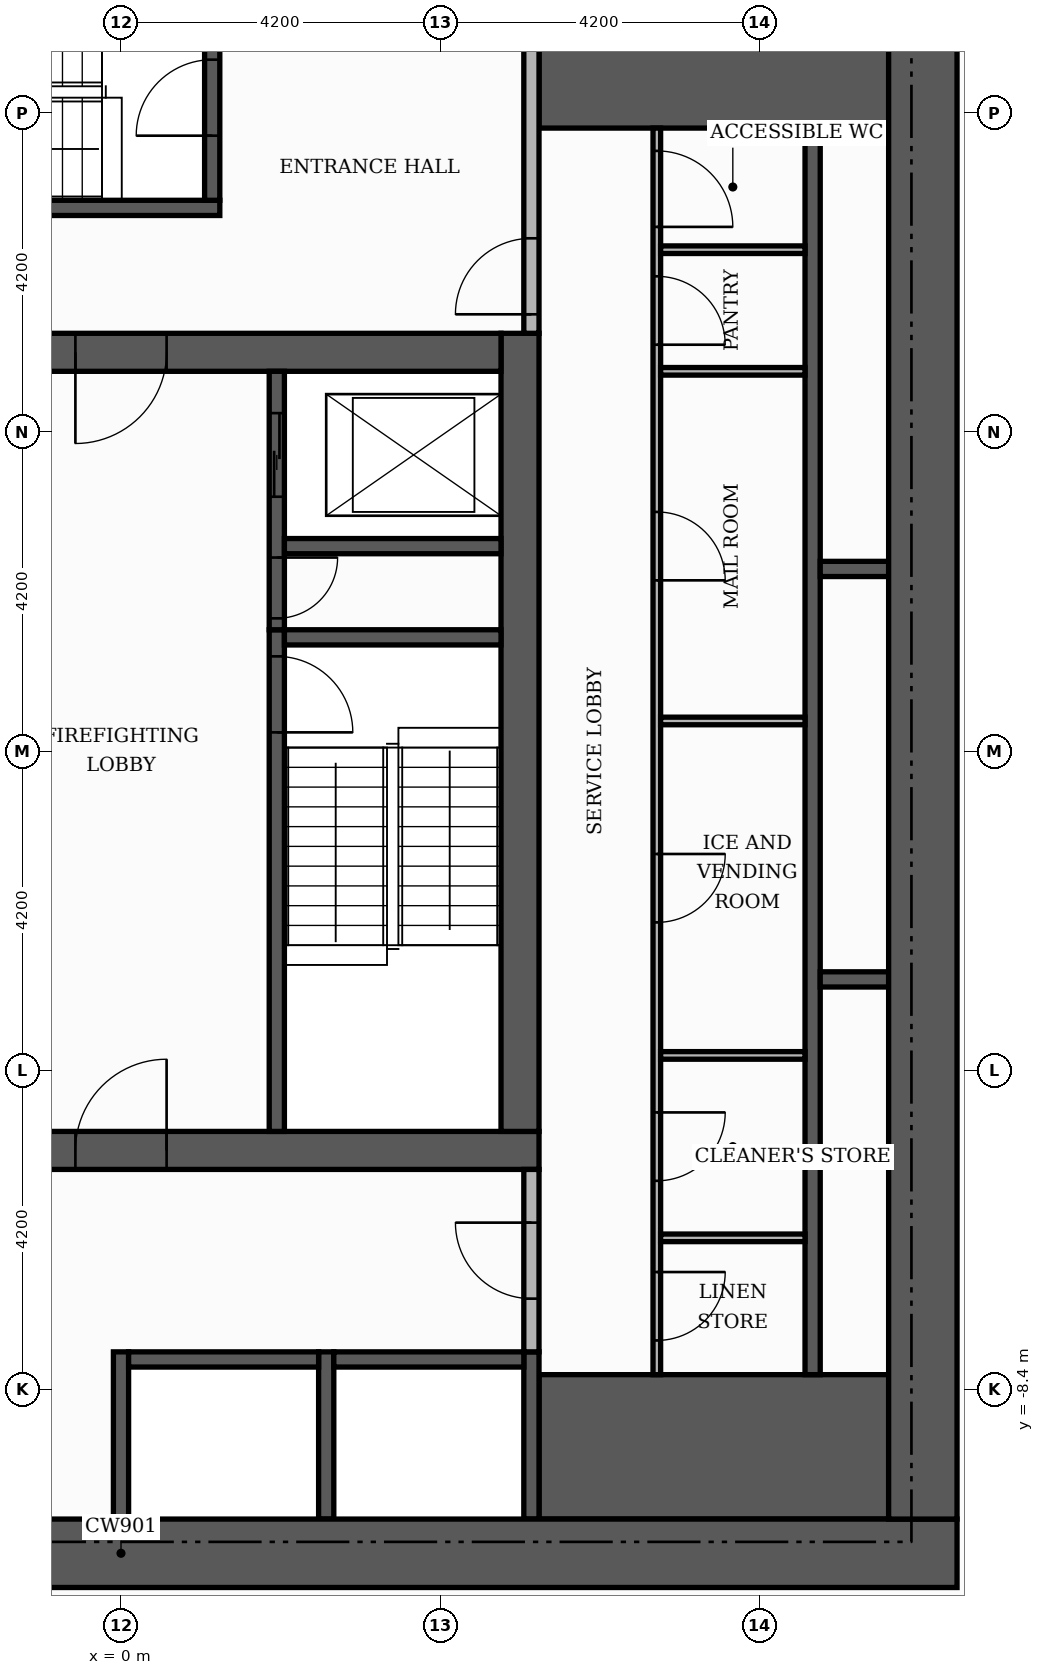
"""IFC4 building model, lengths in metres.
Left out: names, types, materials, properties, quantities, classifications, styles, units other than length and angle.
Written with IfcOpenShell. Run it as: python <this file> out.ifc"""

import sys

from ifc_helpers import new_model, si_unit, direction, frame, frame_2d, origin, place, context, subcontext, project, spatial, rectangle, extrude, element, fill, save


model = new_model("IFC4")
c1 = context("Model", 3, precision=1e-05, world=origin(), true_north=direction((0.0, 1.0)))
c2 = subcontext(c1, "Body", "Model", "MODEL_VIEW")
j1 = project(units=[si_unit("LENGTHUNIT", "METRE"), si_unit("PLANEANGLEUNIT", "RADIAN")], contexts=[c1])
p1 = place(None, origin())
s1 = spatial("IfcSite", under=j1, at=p1, CompositionType="ELEMENT")
p2 = place(p1, origin())
s2 = spatial("IfcBuilding", under=s1, at=p2, CompositionType="ELEMENT")
p3 = place(p2, frame((0.0, 0.0, 50.4)))
s3 = spatial("IfcBuildingStorey", under=s2, at=p3, CompositionType="ELEMENT", Elevation=50.4)
p4 = place(p3, frame((-5.5, -5.25, 0.0), z_axis=(0.0, 0.0, 1.0), x_axis=(1.0, 0.0, 0.0)))
e1 = element("IfcWall", 1, at=p4, inside=s3, PredefinedType="SHEAR", context=c2, shape_type="SweptSolid", body=[
    extrude(rectangle(XDim=11.0, YDim=0.5, at=frame_2d((5.5, 0.0))), origin(), (0.0, 0.0, 1.0), 3.48),
])
p5 = place(p4, frame((4.9, 0.0, 0.0)))
e2 = element("IfcOpeningElement", 2, at=p5, cuts=e1, PredefinedType="OPENING", context=c2, shape_type="SweptSolid", body=[
    extrude(rectangle(XDim=1.2, YDim=2.1, at=frame_2d((0.6, 1.05))), frame((0.0, 0.26, 0.0), z_axis=(0.0, -1.0, 0.0), x_axis=(1.0, 0.0, 0.0)), (0.0, 0.0, 1.0), 0.52),
])
p6 = place(p3, frame((5.25, -5.0, 0.0), z_axis=(0.0, 0.0, 1.0), x_axis=(0.0, 1.0, 0.0)))
e3 = element("IfcWall", 3, at=p6, inside=s3, PredefinedType="SHEAR", context=c2, shape_type="SweptSolid", body=[
    extrude(rectangle(XDim=10.5, YDim=0.5, at=frame_2d((5.25, 0.0))), origin(), (0.0, 0.0, 1.0), 3.48),
])
p7 = place(p3, frame((-5.0, 5.25, 0.0), z_axis=(0.0, 0.0, 1.0), x_axis=(1.0, 0.0, 0.0)))
e4 = element("IfcWall", 4, at=p7, inside=s3, PredefinedType="SHEAR", context=c2, shape_type="SweptSolid", body=[
    extrude(rectangle(XDim=10.0, YDim=0.5, at=frame_2d((5.0, 0.0))), origin(), (0.0, 0.0, 1.0), 3.48),
])
p8 = place(p7, frame((4.4, 0.0, 0.0)))
e5 = element("IfcOpeningElement", 5, at=p8, cuts=e4, PredefinedType="OPENING", context=c2, shape_type="SweptSolid", body=[
    extrude(rectangle(XDim=1.2, YDim=2.1, at=frame_2d((0.6, 1.05))), frame((0.0, 0.26, 0.0), z_axis=(0.0, -1.0, 0.0), x_axis=(1.0, 0.0, 0.0)), (0.0, 0.0, 1.0), 0.52),
])
for number, where, z_axis, x_axis in (
    (6, (5.5, -9.15, 0.0), (0.0, 0.0, 1.0), (1.0, 0.0, 0.0)),
    (7, (5.5, 9.15, 0.0), (0.0, 0.0, 1.0), (1.0, 0.0, 0.0)),
):
    element("IfcWall", number, at=place(p3, frame(where, z_axis=z_axis, x_axis=x_axis)), inside=s3, PredefinedType="SHEAR", context=c2, shape_type="SweptSolid", body=[
        extrude(rectangle(XDim=4.6, YDim=1.9, at=frame_2d((2.3, 0.0))), origin(), (0.0, 0.0, 1.0), 3.48),
    ])
p9 = place(p3, frame((2.05, -5.0, 0.0), z_axis=(0.0, 0.0, 1.0), x_axis=(0.0, 1.0, 0.0)))
e8 = element("IfcWall", 8, at=p9, inside=s3, PredefinedType="SHEAR", context=c2, shape_type="SweptSolid", body=[
    extrude(rectangle(XDim=6.6, YDim=0.2, at=frame_2d((3.3, 0.0))), origin(), (0.0, 0.0, 1.0), 3.48),
])
p10 = place(p9, frame((5.25, 0.0, 0.0)))
e9 = element("IfcOpeningElement", 9, at=p10, cuts=e8, PredefinedType="OPENING", context=c2, shape_type="SweptSolid", body=[
    extrude(rectangle(XDim=1.0, YDim=2.1, at=frame_2d((0.5, 1.05))), frame((0.0, 0.11, 0.0), z_axis=(0.0, -1.0, 0.0), x_axis=(1.0, 0.0, 0.0)), (0.0, 0.0, 1.0), 0.22),
])
p11 = place(p3, frame((2.15, 1.5, 0.0), z_axis=(0.0, 0.0, 1.0), x_axis=(1.0, 0.0, 0.0)))
e10 = element("IfcWall", 10, at=p11, inside=s3, PredefinedType="SHEAR", context=c2, shape_type="SweptSolid", body=[
    extrude(rectangle(XDim=2.85, YDim=0.2, at=frame_2d((1.425, 0.0))), origin(), (0.0, 0.0, 1.0), 3.48),
])
p12 = place(p3, frame((-5.5, 7.15, 0.0), z_axis=(0.0, 0.0, 1.0), x_axis=(1.0, 0.0, 0.0)))
e11 = element("IfcWall", 11, at=p12, inside=s3, PredefinedType="SHEAR", context=c2, shape_type="SweptSolid", body=[
    extrude(rectangle(XDim=6.8, YDim=0.2, at=frame_2d((3.4, 0.0))), origin(), (0.0, 0.0, 1.0), 3.48),
])
p13 = place(p3, frame((1.2, 7.25, 0.0), z_axis=(0.0, 0.0, 1.0), x_axis=(0.0, 1.0, 0.0)))
e12 = element("IfcWall", 12, at=p13, inside=s3, PredefinedType="SHEAR", context=c2, shape_type="SweptSolid", body=[
    extrude(rectangle(XDim=2.85, YDim=0.2, at=frame_2d((1.425, 0.0))), origin(), (0.0, 0.0, 1.0), 3.48),
])
p14 = place(p13, frame((0.85, 0.0, 0.0)))
e13 = element("IfcOpeningElement", 13, at=p14, cuts=e12, PredefinedType="OPENING", context=c2, shape_type="SweptSolid", body=[
    extrude(rectangle(XDim=1.0, YDim=2.1, at=frame_2d((0.5, 1.05))), frame((0.0, 0.11, 0.0), z_axis=(0.0, -1.0, 0.0), x_axis=(1.0, 0.0, 0.0)), (0.0, 0.0, 1.0), 0.22),
])
for number, where, z_axis, x_axis in (
    (14, (0.0, -10.1, 0.0), (0.0, 0.0, 1.0), (0.0, 1.0, 0.0)),
    (15, (2.7, -10.1, 0.0), (0.0, 0.0, 1.0), (0.0, 1.0, 0.0)),
    (16, (5.4, -10.1, 0.0), (0.0, 0.0, 1.0), (0.0, 1.0, 0.0)),
):
    element("IfcWall", number, at=place(p3, frame(where, z_axis=z_axis, x_axis=x_axis)), inside=s3, PredefinedType="SHEAR", context=c2, shape_type="SweptSolid", body=[
        extrude(rectangle(XDim=2.2, YDim=0.2, at=frame_2d((1.1, 0.0))), origin(), (0.0, 0.0, 1.0), 3.48),
    ])
p15 = place(p3, frame((9.1, -8.2, 0.0), z_axis=(0.0, 0.0, 1.0), x_axis=(0.0, 1.0, 0.0)))
e17 = element("IfcWall", 17, at=p15, inside=s3, PredefinedType="SHEAR", context=c2, shape_type="SweptSolid", body=[
    extrude(rectangle(XDim=16.4, YDim=0.2, at=frame_2d((8.2, 0.0))), origin(), (0.0, 0.0, 1.0), 3.48),
])
for number, where, z_axis, x_axis in (
    (18, (0.1, -8.0, 0.0), (0.0, 0.0, 1.0), (1.0, 0.0, 0.0)),
    (19, (2.8, -8.0, 0.0), (0.0, 0.0, 1.0), (1.0, 0.0, 0.0)),
):
    element("IfcWall", number, at=place(p3, frame(where, z_axis=z_axis, x_axis=x_axis)), inside=s3, PredefinedType="SHEAR", context=c2, shape_type="SweptSolid", body=[
        extrude(rectangle(XDim=2.5, YDim=0.2, at=frame_2d((1.25, 0.0))), origin(), (0.0, 0.0, 1.0), 3.48),
    ])
p16 = place(p3, frame((9.2, -3.0, 0.0), z_axis=(0.0, 0.0, 1.0), x_axis=(1.0, 0.0, 0.0)))
e20 = element("IfcWall", 20, at=p16, inside=s3, PredefinedType="SHEAR", context=c2, shape_type="SweptSolid", body=[
    extrude(rectangle(XDim=0.9, YDim=0.2, at=frame_2d((0.45, 0.0))), origin(), (0.0, 0.0, 1.0), 3.48),
])
p17 = place(p3, frame((2.05, 1.6, 0.0), z_axis=(0.0, 0.0, 1.0), x_axis=(0.0, 1.0, 0.0)))
e21 = element("IfcWall", 21, at=p17, inside=s3, PredefinedType="SHEAR", context=c2, shape_type="SweptSolid", body=[
    extrude(rectangle(XDim=3.4, YDim=0.2, at=frame_2d((1.7, 0.0))), origin(), (0.0, 0.0, 1.0), 3.48),
])
p18 = place(p17, frame((1.75, 0.0, 0.0)))
e22 = element("IfcOpeningElement", 22, at=p18, cuts=e21, PredefinedType="OPENING", context=c2, shape_type="SweptSolid", body=[
    extrude(rectangle(XDim=1.1, YDim=2.1, at=frame_2d((0.55, 1.05))), frame((0.0, 0.11, 0.0), z_axis=(0.0, -1.0, 0.0), x_axis=(1.0, 0.0, 0.0)), (0.0, 0.0, 1.0), 0.22),
])
p19 = place(p17, frame((0.15, 0.0, 0.0)))
e23 = element("IfcOpeningElement", 23, at=p19, cuts=e21, PredefinedType="OPENING", context=c2, shape_type="SweptSolid", body=[
    extrude(rectangle(XDim=0.8, YDim=2.1, at=frame_2d((0.4, 1.05))), frame((0.0, 0.11, 0.0), z_axis=(0.0, -1.0, 0.0), x_axis=(1.0, 0.0, 0.0)), (0.0, 0.0, 1.0), 0.22),
])
p20 = place(p3, frame((9.2, 2.4, 0.0), z_axis=(0.0, 0.0, 1.0), x_axis=(1.0, 0.0, 0.0)))
e24 = element("IfcWall", 24, at=p20, inside=s3, PredefinedType="SHEAR", context=c2, shape_type="SweptSolid", body=[
    extrude(rectangle(XDim=0.9, YDim=0.2, at=frame_2d((0.45, 0.0))), origin(), (0.0, 0.0, 1.0), 3.48),
])
p21 = place(p3, frame((2.15, 2.7, 0.0), z_axis=(0.0, 0.0, 1.0), x_axis=(1.0, 0.0, 0.0)))
e25 = element("IfcWall", 25, at=p21, inside=s3, PredefinedType="SHEAR", context=c2, shape_type="SweptSolid", body=[
    extrude(rectangle(XDim=2.85, YDim=0.2, at=frame_2d((1.425, 0.0))), origin(), (0.0, 0.0, 1.0), 3.48),
])
p22 = place(p3, frame((-11.0, -10.55, 0.0), z_axis=(0.0, 0.0, 1.0), x_axis=(1.0, 0.0, 0.0)))
e26 = element("IfcWall", 26, at=p22, inside=s3, PredefinedType="SHEAR", context=c2, shape_type="SweptSolid", body=[
    extrude(rectangle(XDim=22.0, YDim=0.9, at=frame_2d((11.0, 0.0))), origin(), (0.0, 0.0, 1.0), 3.48),
])
p23 = place(p22, frame((7.4, 0.0, 0.0)))
e27 = element("IfcOpeningElement", 27, at=p23, cuts=e26, PredefinedType="OPENING", context=c2, shape_type="SweptSolid", body=[
    extrude(rectangle(XDim=1.8, YDim=2.2, at=frame_2d((0.9, 1.1))), frame((0.0, 0.46, 0.0), z_axis=(0.0, -1.0, 0.0), x_axis=(1.0, 0.0, 0.0)), (0.0, 0.0, 1.0), 0.92),
])
p24 = place(p3, frame((10.55, -10.1, 0.0), z_axis=(0.0, 0.0, 1.0), x_axis=(0.0, 1.0, 0.0)))
e28 = element("IfcWall", 28, at=p24, inside=s3, PredefinedType="SHEAR", context=c2, shape_type="SweptSolid", body=[
    extrude(rectangle(XDim=20.2, YDim=0.9, at=frame_2d((10.1, 0.0))), origin(), (0.0, 0.0, 1.0), 3.48),
])
p25 = place(p3, frame((7.05, -8.2, 0.0), z_axis=(0.0, 0.0, 1.0), x_axis=(0.0, 1.0, 0.0)))
e29 = element("IfcWall", 29, at=p25, inside=s3, PredefinedType="PARTITIONING", context=c2, shape_type="SweptSolid", body=[
    extrude(rectangle(XDim=16.4, YDim=0.1, at=frame_2d((8.2, 0.0))), origin(), (0.0, 0.0, 1.0), 3.48),
])
p26 = place(p25, frame((0.45, 0.0, 0.0)))
e30 = element("IfcOpeningElement", 30, at=p26, cuts=e29, PredefinedType="OPENING", context=c2, shape_type="SweptSolid", body=[
    extrude(rectangle(XDim=0.9, YDim=2.1, at=frame_2d((0.45, 1.05))), frame((0.0, 0.06, 0.0), z_axis=(0.0, -1.0, 0.0), x_axis=(1.0, 0.0, 0.0)), (0.0, 0.0, 1.0), 0.12),
])
p27 = place(p25, frame((2.55, 0.0, 0.0)))
e31 = element("IfcOpeningElement", 31, at=p27, cuts=e29, PredefinedType="OPENING", context=c2, shape_type="SweptSolid", body=[
    extrude(rectangle(XDim=0.9, YDim=2.1, at=frame_2d((0.45, 1.05))), frame((0.0, 0.06, 0.0), z_axis=(0.0, -1.0, 0.0), x_axis=(1.0, 0.0, 0.0)), (0.0, 0.0, 1.0), 0.12),
])
p28 = place(p25, frame((5.95, 0.0, 0.0)))
e32 = element("IfcOpeningElement", 32, at=p28, cuts=e29, PredefinedType="OPENING", context=c2, shape_type="SweptSolid", body=[
    extrude(rectangle(XDim=0.9, YDim=2.1, at=frame_2d((0.45, 1.05))), frame((0.0, 0.06, 0.0), z_axis=(0.0, -1.0, 0.0), x_axis=(1.0, 0.0, 0.0)), (0.0, 0.0, 1.0), 0.12),
])
p29 = place(p25, frame((10.45, 0.0, 0.0)))
e33 = element("IfcOpeningElement", 33, at=p29, cuts=e29, PredefinedType="OPENING", context=c2, shape_type="SweptSolid", body=[
    extrude(rectangle(XDim=0.9, YDim=2.1, at=frame_2d((0.45, 1.05))), frame((0.0, 0.06, 0.0), z_axis=(0.0, -1.0, 0.0), x_axis=(1.0, 0.0, 0.0)), (0.0, 0.0, 1.0), 0.12),
])
p30 = place(p25, frame((13.55, 0.0, 0.0)))
e34 = element("IfcOpeningElement", 34, at=p30, cuts=e29, PredefinedType="OPENING", context=c2, shape_type="SweptSolid", body=[
    extrude(rectangle(XDim=0.9, YDim=2.1, at=frame_2d((0.45, 1.05))), frame((0.0, 0.06, 0.0), z_axis=(0.0, -1.0, 0.0), x_axis=(1.0, 0.0, 0.0)), (0.0, 0.0, 1.0), 0.12),
])
p31 = place(p25, frame((15.1, 0.0, 0.0)))
e35 = element("IfcOpeningElement", 35, at=p31, cuts=e29, PredefinedType="OPENING", context=c2, shape_type="SweptSolid", body=[
    extrude(rectangle(XDim=1.0, YDim=2.1, at=frame_2d((0.5, 1.05))), frame((0.0, 0.06, 0.0), z_axis=(0.0, -1.0, 0.0), x_axis=(1.0, 0.0, 0.0)), (0.0, 0.0, 1.0), 0.12),
])
p32 = place(p3, frame((5.4, -7.9, 0.0), z_axis=(0.0, 0.0, 1.0), x_axis=(0.0, 1.0, 0.0)))
e36 = element("IfcWall", 36, at=p32, inside=s3, PredefinedType="PARTITIONING", context=c2, shape_type="SweptSolid", body=[
    extrude(rectangle(XDim=2.4, YDim=0.2, at=frame_2d((1.2, 0.0))), origin(), (0.0, 0.0, 1.0), 3.48),
])
p33 = place(p32, frame((0.7, 0.0, 0.0)))
e37 = element("IfcOpeningElement", 37, at=p33, cuts=e36, PredefinedType="OPENING", context=c2, shape_type="SweptSolid", body=[
    extrude(rectangle(XDim=1.0, YDim=2.1, at=frame_2d((0.5, 1.05))), frame((0.0, 0.11, 0.0), z_axis=(0.0, -1.0, 0.0), x_axis=(1.0, 0.0, 0.0)), (0.0, 0.0, 1.0), 0.22),
])
for number, where, z_axis, x_axis in (
    (38, (7.1, -6.4, 0.0), (0.0, 0.0, 1.0), (1.0, 0.0, 0.0)),
    (39, (7.1, -4.0, 0.0), (0.0, 0.0, 1.0), (1.0, 0.0, 0.0)),
    (40, (7.1, 0.4, 0.0), (0.0, 0.0, 1.0), (1.0, 0.0, 0.0)),
    (41, (7.1, 5.0, 0.0), (0.0, 0.0, 1.0), (1.0, 0.0, 0.0)),
):
    element("IfcWall", number, at=place(p3, frame(where, z_axis=z_axis, x_axis=x_axis)), inside=s3, PredefinedType="PARTITIONING", context=c2, shape_type="SweptSolid", body=[
        extrude(rectangle(XDim=1.9, YDim=0.1, at=frame_2d((0.95, 0.0))), origin(), (0.0, 0.0, 1.0), 3.48),
    ])
p34 = place(p3, frame((5.4, 5.5, 0.0), z_axis=(0.0, 0.0, 1.0), x_axis=(0.0, 1.0, 0.0)))
e42 = element("IfcWall", 42, at=p34, inside=s3, PredefinedType="PARTITIONING", context=c2, shape_type="SweptSolid", body=[
    extrude(rectangle(XDim=4.6, YDim=0.2, at=frame_2d((2.3, 0.0))), origin(), (0.0, 0.0, 1.0), 3.48),
])
p35 = place(p34, frame((0.25, 0.0, 0.0)))
e43 = element("IfcOpeningElement", 43, at=p35, cuts=e42, PredefinedType="OPENING", context=c2, shape_type="SweptSolid", body=[
    extrude(rectangle(XDim=1.0, YDim=2.1, at=frame_2d((0.5, 1.05))), frame((0.0, 0.11, 0.0), z_axis=(0.0, -1.0, 0.0), x_axis=(1.0, 0.0, 0.0)), (0.0, 0.0, 1.0), 0.22),
])
p36 = place(p3, frame((7.1, 6.6, 0.0), z_axis=(0.0, 0.0, 1.0), x_axis=(1.0, 0.0, 0.0)))
e44 = element("IfcWall", 44, at=p36, inside=s3, PredefinedType="PARTITIONING", context=c2, shape_type="SweptSolid", body=[
    extrude(rectangle(XDim=1.9, YDim=0.1, at=frame_2d((0.95, 0.0))), origin(), (0.0, 0.0, 1.0), 3.48),
])
p37 = place(p18, origin())
e45 = element("IfcDoor", 45, at=p37, inside=s3, OperationType="SLIDING_TO_LEFT", PredefinedType="DOOR", context=c2, shape_type="SweptSolid", body=[
    extrude(rectangle(XDim=1.1, YDim=2.1, at=frame_2d((0.55, 1.05))), frame((0.0, 0.025, 0.0), z_axis=(0.0, -1.0, 0.0), x_axis=(1.0, 0.0, 0.0)), (0.0, 0.0, 1.0), 0.05),
])
fill(e22, e45)
p38 = place(p10, frame((1.0, 0.0, 0.0), z_axis=(0.0, 0.0, 1.0), x_axis=(-1.0, 0.0, 0.0)))
e46 = element("IfcDoor", 46, at=p38, inside=s3, OperationType="SINGLE_SWING_LEFT", PredefinedType="DOOR", context=c2, shape_type="SweptSolid", body=[
    extrude(rectangle(XDim=1.0, YDim=2.1, at=frame_2d((0.5, 1.05))), frame((0.0, 0.025, 0.0), z_axis=(0.0, -1.0, 0.0), x_axis=(1.0, 0.0, 0.0)), (0.0, 0.0, 1.0), 0.05),
])
fill(e9, e46)
p39 = place(p19, frame((0.8, 0.0, 0.0), z_axis=(0.0, 0.0, 1.0), x_axis=(-1.0, 0.0, 0.0)))
e47 = element("IfcDoor", 47, at=p39, inside=s3, OperationType="SINGLE_SWING_RIGHT", PredefinedType="DOOR", context=c2, shape_type="SweptSolid", body=[
    extrude(rectangle(XDim=0.8, YDim=2.1, at=frame_2d((0.4, 1.05))), frame((0.0, 0.025, 0.0), z_axis=(0.0, -1.0, 0.0), x_axis=(1.0, 0.0, 0.0)), (0.0, 0.0, 1.0), 0.05),
])
fill(e23, e47)
p40 = place(p8, frame((1.2, 0.0, 0.0), z_axis=(0.0, 0.0, 1.0), x_axis=(-1.0, 0.0, 0.0)))
e48 = element("IfcDoor", 48, at=p40, inside=s3, OperationType="SINGLE_SWING_LEFT", PredefinedType="DOOR", context=c2, shape_type="SweptSolid", body=[
    extrude(rectangle(XDim=1.2, YDim=2.1, at=frame_2d((0.6, 1.05))), frame((0.0, 0.025, 0.0), z_axis=(0.0, -1.0, 0.0), x_axis=(1.0, 0.0, 0.0)), (0.0, 0.0, 1.0), 0.05),
])
fill(e5, e48)
p41 = place(p5, origin())
e49 = element("IfcDoor", 49, at=p41, inside=s3, OperationType="SINGLE_SWING_RIGHT", PredefinedType="DOOR", context=c2, shape_type="SweptSolid", body=[
    extrude(rectangle(XDim=1.2, YDim=2.1, at=frame_2d((0.6, 1.05))), frame((0.0, 0.025, 0.0), z_axis=(0.0, -1.0, 0.0), x_axis=(1.0, 0.0, 0.0)), (0.0, 0.0, 1.0), 0.05),
])
fill(e2, e49)
p42 = place(p14, origin())
e50 = element("IfcDoor", 50, at=p42, inside=s3, OperationType="SINGLE_SWING_LEFT", PredefinedType="DOOR", context=c2, shape_type="SweptSolid", body=[
    extrude(rectangle(XDim=1.0, YDim=2.1, at=frame_2d((0.5, 1.05))), frame((0.0, 0.025, 0.0), z_axis=(0.0, -1.0, 0.0), x_axis=(1.0, 0.0, 0.0)), (0.0, 0.0, 1.0), 0.05),
])
fill(e13, e50)
p43 = place(p35, origin())
e51 = element("IfcDoor", 51, at=p43, inside=s3, OperationType="SINGLE_SWING_LEFT", PredefinedType="DOOR", context=c2, shape_type="SweptSolid", body=[
    extrude(rectangle(XDim=1.0, YDim=2.1, at=frame_2d((0.5, 1.05))), frame((0.0, 0.025, 0.0), z_axis=(0.0, -1.0, 0.0), x_axis=(1.0, 0.0, 0.0)), (0.0, 0.0, 1.0), 0.05),
])
fill(e43, e51)
p44 = place(p33, origin())
e52 = element("IfcDoor", 52, at=p44, inside=s3, OperationType="SINGLE_SWING_RIGHT", PredefinedType="DOOR", context=c2, shape_type="SweptSolid", body=[
    extrude(rectangle(XDim=1.0, YDim=2.1, at=frame_2d((0.5, 1.05))), frame((0.0, 0.025, 0.0), z_axis=(0.0, -1.0, 0.0), x_axis=(1.0, 0.0, 0.0)), (0.0, 0.0, 1.0), 0.05),
])
fill(e37, e52)
p45 = place(p26, frame((0.9, 0.0, 0.0), z_axis=(0.0, 0.0, 1.0), x_axis=(-1.0, 0.0, 0.0)))
e53 = element("IfcDoor", 53, at=p45, inside=s3, OperationType="SINGLE_SWING_RIGHT", PredefinedType="DOOR", context=c2, shape_type="SweptSolid", body=[
    extrude(rectangle(XDim=0.9, YDim=2.1, at=frame_2d((0.45, 1.05))), frame((0.0, 0.025, 0.0), z_axis=(0.0, -1.0, 0.0), x_axis=(1.0, 0.0, 0.0)), (0.0, 0.0, 1.0), 0.05),
])
fill(e30, e53)
p46 = place(p27, frame((0.9, 0.0, 0.0), z_axis=(0.0, 0.0, 1.0), x_axis=(-1.0, 0.0, 0.0)))
e54 = element("IfcDoor", 54, at=p46, inside=s3, OperationType="SINGLE_SWING_RIGHT", PredefinedType="DOOR", context=c2, shape_type="SweptSolid", body=[
    extrude(rectangle(XDim=0.9, YDim=2.1, at=frame_2d((0.45, 1.05))), frame((0.0, 0.025, 0.0), z_axis=(0.0, -1.0, 0.0), x_axis=(1.0, 0.0, 0.0)), (0.0, 0.0, 1.0), 0.05),
])
fill(e31, e54)
p47 = place(p28, frame((0.9, 0.0, 0.0), z_axis=(0.0, 0.0, 1.0), x_axis=(-1.0, 0.0, 0.0)))
e55 = element("IfcDoor", 55, at=p47, inside=s3, OperationType="SINGLE_SWING_RIGHT", PredefinedType="DOOR", context=c2, shape_type="SweptSolid", body=[
    extrude(rectangle(XDim=0.9, YDim=2.1, at=frame_2d((0.45, 1.05))), frame((0.0, 0.025, 0.0), z_axis=(0.0, -1.0, 0.0), x_axis=(1.0, 0.0, 0.0)), (0.0, 0.0, 1.0), 0.05),
])
fill(e32, e55)
p48 = place(p29, frame((0.9, 0.0, 0.0), z_axis=(0.0, 0.0, 1.0), x_axis=(-1.0, 0.0, 0.0)))
e56 = element("IfcDoor", 56, at=p48, inside=s3, OperationType="SINGLE_SWING_LEFT", PredefinedType="DOOR", context=c2, shape_type="SweptSolid", body=[
    extrude(rectangle(XDim=0.9, YDim=2.1, at=frame_2d((0.45, 1.05))), frame((0.0, 0.025, 0.0), z_axis=(0.0, -1.0, 0.0), x_axis=(1.0, 0.0, 0.0)), (0.0, 0.0, 1.0), 0.05),
])
fill(e33, e56)
p49 = place(p30, frame((0.9, 0.0, 0.0), z_axis=(0.0, 0.0, 1.0), x_axis=(-1.0, 0.0, 0.0)))
e57 = element("IfcDoor", 57, at=p49, inside=s3, OperationType="SINGLE_SWING_LEFT", PredefinedType="DOOR", context=c2, shape_type="SweptSolid", body=[
    extrude(rectangle(XDim=0.9, YDim=2.1, at=frame_2d((0.45, 1.05))), frame((0.0, 0.025, 0.0), z_axis=(0.0, -1.0, 0.0), x_axis=(1.0, 0.0, 0.0)), (0.0, 0.0, 1.0), 0.05),
])
fill(e34, e57)
p50 = place(p31, frame((1.0, 0.0, 0.0), z_axis=(0.0, 0.0, 1.0), x_axis=(-1.0, 0.0, 0.0)))
e58 = element("IfcDoor", 58, at=p50, inside=s3, OperationType="SINGLE_SWING_LEFT", PredefinedType="DOOR", context=c2, shape_type="SweptSolid", body=[
    extrude(rectangle(XDim=1.0, YDim=2.1, at=frame_2d((0.5, 1.05))), frame((0.0, 0.025, 0.0), z_axis=(0.0, -1.0, 0.0), x_axis=(1.0, 0.0, 0.0)), (0.0, 0.0, 1.0), 0.05),
])
fill(e35, e58)
save(model, sys.argv[1])
